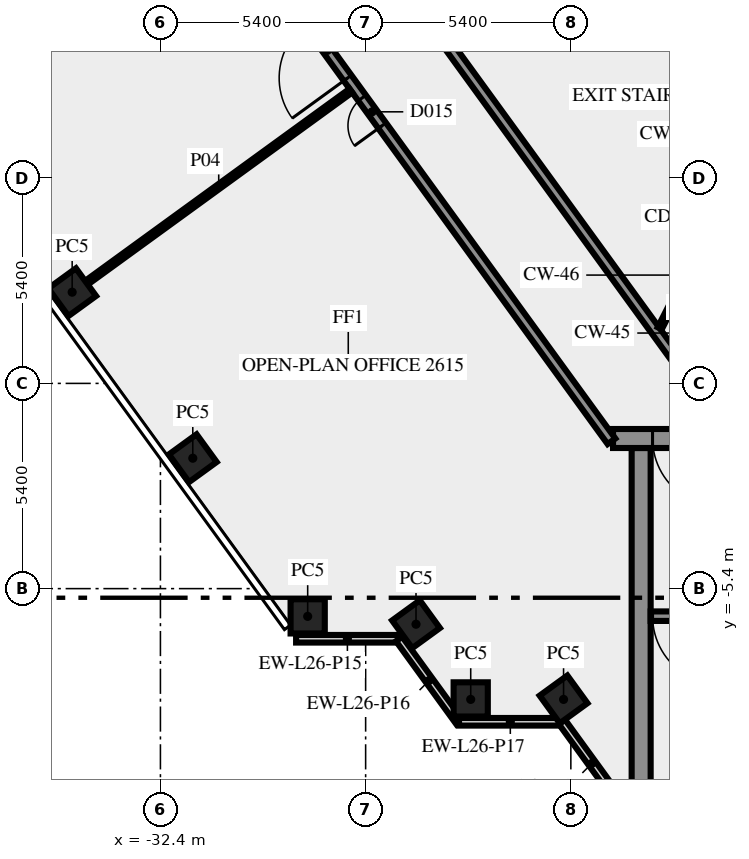
"""IFC4 building model, lengths in metres.
Left out: names, types, materials, properties, quantities, classifications, styles, units other than length and angle.
Written with IfcOpenShell. Run it as: python <this file> out.ifc"""

import sys

from ifc_helpers import new_model, si_unit, direction, frame, frame_2d, origin, origin_2d, place, context, subcontext, project, spatial, rectangle, extrude, element, fill, save


model = new_model("IFC4")
c1 = context("Model", 3, precision=1e-05, world=origin(), true_north=direction((0.0, 1.0)))
c2 = subcontext(c1, "Body", "Model", "MODEL_VIEW")
j1 = project(units=[si_unit("LENGTHUNIT", "METRE"), si_unit("PLANEANGLEUNIT", "RADIAN")], contexts=[c1])
p1 = place(None, origin())
s1 = spatial("IfcSite", under=j1, at=p1, CompositionType="ELEMENT")
p2 = place(p1, origin())
s2 = spatial("IfcBuilding", under=s1, at=p2, CompositionType="ELEMENT")
p3 = place(p2, frame((0.0, 0.0, 113.0)))
s3 = spatial("IfcBuildingStorey", under=s2, at=p3, CompositionType="ELEMENT", Elevation=113.0)
for number, where, z_axis, x_axis in (
    (1, (-34.722, 2.4, 0.0), (0.0, 0.0, 1.0), (0.588, -0.809, 0.0)),
    (2, (-31.548, -1.969, 0.0), (0.0, 0.0, 1.0), (0.588, -0.809, 0.0)),
    (3, (-28.525, -6.13, 0.0), (0.0, 0.0, 1.0), (1.0, 0.0, 0.0)),
    (4, (-25.674, -6.337, 0.0), (0.0, 0.0, 1.0), (0.588, -0.809, 0.0)),
    (5, (-24.235, -8.315, 0.0), (0.0, 0.0, 1.0), (1.0, 0.0, 0.0)),
    (6, (-21.792, -8.315, 0.0), (0.0, 0.0, 1.0), (0.588, -0.809, 0.0)),
):
    element("IfcColumn", number, at=place(p3, frame(where, z_axis=z_axis, x_axis=x_axis)), inside=s3, PredefinedType="COLUMN", context=c2, shape_type="SweptSolid", body=[
        extrude(rectangle(XDim=0.9, YDim=0.9, at=origin_2d()), origin(), (0.0, 0.0, 1.0), 3.65),
    ])
p4 = place(p3, frame((-28.83, -6.719, 0.0), z_axis=(0.0, 0.0, 1.0), x_axis=(1.0, 0.0, 0.0)))
e7 = element("IfcWall", 7, at=p4, inside=s3, PredefinedType="SOLIDWALL", context=c2, shape_type="SweptSolid", body=[
    extrude(rectangle(XDim=2.7, YDim=0.2, at=frame_2d((1.35, 0.0))), origin(), (0.0, 0.0, 1.0), 3.65),
])
p5 = place(p3, frame((-26.12, -6.724, 0.0), z_axis=(0.0, 0.0, 1.0), x_axis=(0.587720002413, -0.809064397168, 0.0)))
e8 = element("IfcWall", 8, at=p5, inside=s3, PredefinedType="SOLIDWALL", context=c2, shape_type="SweptSolid", body=[
    extrude(rectangle(XDim=2.7, YDim=0.2, at=frame_2d((1.35, 0.0))), origin(), (0.0, 0.0, 1.0), 3.65),
])
p6 = place(p3, frame((-24.543, -8.904, 0.0), z_axis=(0.0, 0.0, 1.0), x_axis=(1.0, 0.0, 0.0)))
e9 = element("IfcWall", 9, at=p6, inside=s3, PredefinedType="SOLIDWALL", context=c2, shape_type="SweptSolid", body=[
    extrude(rectangle(XDim=2.7, YDim=0.2, at=frame_2d((1.35, 0.0))), origin(), (0.0, 0.0, 1.0), 3.65),
])
p7 = place(p3, frame((-21.833, -8.909, 0.0), z_axis=(0.0, 0.0, 1.0), x_axis=(0.587766567315, -0.809030569476, 0.0)))
e10 = element("IfcWall", 10, at=p7, inside=s3, PredefinedType="SOLIDWALL", context=c2, shape_type="SweptSolid", body=[
    extrude(rectangle(XDim=2.688, YDim=0.2, at=frame_2d((1.344, 0.0))), origin(), (0.0, 0.0, 1.0), 3.65),
])
p8 = place(p3, frame((-19.75, -10.5, 0.0), z_axis=(0.0, 0.0, 1.0), x_axis=(0.0, 1.0, 0.0)))
e11 = element("IfcWall", 11, at=p8, inside=s3, PredefinedType="SHEAR", context=c2, shape_type="SweptSolid", body=[
    extrude(rectangle(XDim=8.8, YDim=0.5, at=frame_2d((4.4, 0.0))), origin(), (0.0, 0.0, 1.0), 3.65),
])
p9 = place(p3, frame((-11.45, -6.125, 0.0), z_axis=(0.0, 0.0, 1.0), x_axis=(-1.0, 0.0, 0.0)))
e12 = element("IfcWall", 12, at=p9, inside=s3, PredefinedType="SHEAR", context=c2, shape_type="SweptSolid", body=[
    extrude(rectangle(XDim=8.05, YDim=0.25, at=frame_2d((4.025, 0.0))), origin(), (0.0, 0.0, 1.0), 3.65),
])
p10 = place(p9, frame((6.2, 0.0, 0.0)))
e13 = element("IfcOpeningElement", 13, at=p10, cuts=e12, PredefinedType="OPENING", context=c2, shape_type="SweptSolid", body=[
    extrude(rectangle(XDim=1.8, YDim=2.1, at=frame_2d((0.9, 1.05))), frame((0.0, 0.135, 0.0), z_axis=(0.0, -1.0, 0.0), x_axis=(1.0, 0.0, 0.0)), (0.0, 0.0, 1.0), 0.27),
])
p11 = place(p3, frame((20.49, -1.45, 0.0), z_axis=(0.0, 0.0, 1.0), x_axis=(-1.0, 0.0, 0.0)))
e14 = element("IfcWall", 14, at=p11, inside=s3, PredefinedType="SHEAR", context=c2, shape_type="SweptSolid", body=[
    extrude(rectangle(XDim=40.98, YDim=0.5, at=frame_2d((20.49, 0.0))), origin(), (0.0, 0.0, 1.0), 3.65),
])
p12 = place(p11, frame((38.14, 0.0, 0.0)))
e15 = element("IfcOpeningElement", 15, at=p12, cuts=e14, PredefinedType="OPENING", context=c2, shape_type="SweptSolid", body=[
    extrude(rectangle(XDim=1.8, YDim=2.1, at=frame_2d((0.9, 1.05))), frame((0.0, 0.26, 0.0), z_axis=(0.0, -1.0, 0.0), x_axis=(1.0, 0.0, 0.0)), (0.0, 0.0, 1.0), 0.52),
])
p13 = place(p11, frame((36.728, 0.0, 0.0)))
e16 = element("IfcOpeningElement", 16, at=p13, cuts=e14, PredefinedType="OPENING", context=c2, shape_type="SweptSolid", body=[
    extrude(rectangle(XDim=0.8, YDim=2.1, at=frame_2d((0.4, 1.05))), frame((0.0, 0.26, 0.0), z_axis=(0.0, -1.0, 0.0), x_axis=(1.0, 0.0, 0.0)), (0.0, 0.0, 1.0), 0.52),
])
p14 = place(p11, frame((35.153, 0.0, 0.0)))
e17 = element("IfcOpeningElement", 17, at=p14, cuts=e14, PredefinedType="OPENING", context=c2, shape_type="SweptSolid", body=[
    extrude(rectangle(XDim=0.8, YDim=2.1, at=frame_2d((0.4, 1.05))), frame((0.0, 0.26, 0.0), z_axis=(0.0, -1.0, 0.0), x_axis=(1.0, 0.0, 0.0)), (0.0, 0.0, 1.0), 0.52),
])
p15 = place(p11, frame((32.94, 0.0, 0.0)))
e18 = element("IfcOpeningElement", 18, at=p15, cuts=e14, PredefinedType="OPENING", context=c2, shape_type="SweptSolid", body=[
    extrude(rectangle(XDim=0.9, YDim=2.1, at=frame_2d((0.45, 1.05))), frame((0.0, 0.26, 0.0), z_axis=(0.0, -1.0, 0.0), x_axis=(1.0, 0.0, 0.0)), (0.0, 0.0, 1.0), 0.52),
])
p16 = place(p11, frame((21.765, 0.0, 0.0)))
e19 = element("IfcOpeningElement", 19, at=p16, cuts=e14, PredefinedType="OPENING", context=c2, shape_type="SweptSolid", body=[
    extrude(rectangle(XDim=2.0, YDim=2.1, at=frame_2d((1.0, 1.05))), frame((0.0, 0.26, 0.0), z_axis=(0.0, -1.0, 0.0), x_axis=(1.0, 0.0, 0.0)), (0.0, 0.0, 1.0), 0.52),
])
p17 = place(p11, frame((7.14, 0.0, 0.0)))
e20 = element("IfcOpeningElement", 20, at=p17, cuts=e14, PredefinedType="OPENING", context=c2, shape_type="SweptSolid", body=[
    extrude(rectangle(XDim=0.9, YDim=2.1, at=frame_2d((0.45, 1.05))), frame((0.0, 0.26, 0.0), z_axis=(0.0, -1.0, 0.0), x_axis=(1.0, 0.0, 0.0)), (0.0, 0.0, 1.0), 0.52),
])
p18 = place(p11, frame((4.19, 0.0, 0.0)))
e21 = element("IfcOpeningElement", 21, at=p18, cuts=e14, PredefinedType="OPENING", context=c2, shape_type="SweptSolid", body=[
    extrude(rectangle(XDim=0.9, YDim=2.1, at=frame_2d((0.45, 1.05))), frame((0.0, 0.26, 0.0), z_axis=(0.0, -1.0, 0.0), x_axis=(1.0, 0.0, 0.0)), (0.0, 0.0, 1.0), 0.52),
])
p19 = place(p11, frame((1.04, 0.0, 0.0)))
e22 = element("IfcOpeningElement", 22, at=p19, cuts=e14, PredefinedType="OPENING", context=c2, shape_type="SweptSolid", body=[
    extrude(rectangle(XDim=1.8, YDim=2.1, at=frame_2d((0.9, 1.05))), frame((0.0, 0.26, 0.0), z_axis=(0.0, -1.0, 0.0), x_axis=(1.0, 0.0, 0.0)), (0.0, 0.0, 1.0), 0.52),
])
p20 = place(p3, frame((-20.531, -1.523, 0.0), z_axis=(0.0, 0.0, 1.0), x_axis=(-0.587784522481, 0.809017524614, 0.0)))
e23 = element("IfcWall", 23, at=p20, inside=s3, PredefinedType="SOLIDWALL", context=c2, shape_type="SweptSolid", body=[
    extrude(rectangle(XDim=49.912, YDim=0.25, at=frame_2d((24.956, 0.0))), origin(), (0.0, 0.0, 1.0), 3.65),
])
p21 = place(p20, frame((10.266, 0.0, 0.0)))
e24 = element("IfcOpeningElement", 24, at=p21, cuts=e23, PredefinedType="OPENING", context=c2, shape_type="SweptSolid", body=[
    extrude(rectangle(XDim=0.9, YDim=2.1, at=frame_2d((0.45, 1.05))), frame((0.0, 0.135, 0.0), z_axis=(0.0, -1.0, 0.0), x_axis=(1.0, 0.0, 0.0)), (0.0, 0.0, 1.0), 0.27),
])
p22 = place(p20, frame((32.366, 0.0, 0.0)))
e25 = element("IfcOpeningElement", 25, at=p22, cuts=e23, PredefinedType="OPENING", context=c2, shape_type="SweptSolid", body=[
    extrude(rectangle(XDim=1.8, YDim=2.1, at=frame_2d((0.9, 1.05))), frame((0.0, 0.135, 0.0), z_axis=(0.0, -1.0, 0.0), x_axis=(1.0, 0.0, 0.0)), (0.0, 0.0, 1.0), 0.27),
])
p23 = place(p20, frame((11.815, 0.0, 0.0)))
e26 = element("IfcOpeningElement", 26, at=p23, cuts=e23, PredefinedType="OPENING", context=c2, shape_type="SweptSolid", body=[
    extrude(rectangle(XDim=1.8, YDim=2.1, at=frame_2d((0.9, 1.05))), frame((0.0, 0.135, 0.0), z_axis=(0.0, -1.0, 0.0), x_axis=(1.0, 0.0, 0.0)), (0.0, 0.0, 1.0), 0.27),
])
p24 = place(p20, frame((48.57, 0.0, 0.0)))
e27 = element("IfcOpeningElement", 27, at=p24, cuts=e23, PredefinedType="OPENING", context=c2, shape_type="SweptSolid", body=[
    extrude(rectangle(XDim=0.9, YDim=2.1, at=frame_2d((0.45, 1.05))), frame((0.0, 0.135, 0.0), z_axis=(0.0, -1.0, 0.0), x_axis=(1.0, 0.0, 0.0)), (0.0, 0.0, 1.0), 0.27),
])
p25 = place(p20, frame((35.915, 0.0, 0.0)))
e28 = element("IfcOpeningElement", 28, at=p25, cuts=e23, PredefinedType="OPENING", context=c2, shape_type="SweptSolid", body=[
    extrude(rectangle(XDim=0.9, YDim=2.1, at=frame_2d((0.45, 1.05))), frame((0.0, 0.135, 0.0), z_axis=(0.0, -1.0, 0.0), x_axis=(1.0, 0.0, 0.0)), (0.0, 0.0, 1.0), 0.27),
])
p26 = place(p3, frame((-37.232, 25.972, 0.0), z_axis=(0.0, 0.0, 1.0), x_axis=(0.587786323093, -0.809016216391, 0.0)))
e29 = element("IfcWall", 29, at=p26, inside=s3, PredefinedType="SOLIDWALL", context=c2, shape_type="SweptSolid", body=[
    extrude(rectangle(XDim=33.493, YDim=0.25, at=frame_2d((16.747, 0.0))), origin(), (0.0, 0.0, 1.0), 3.65),
])
p27 = place(p26, frame((5.385, 0.0, 0.0)))
e30 = element("IfcOpeningElement", 30, at=p27, cuts=e29, PredefinedType="OPENING", context=c2, shape_type="SweptSolid", body=[
    extrude(rectangle(XDim=0.9, YDim=2.1, at=frame_2d((0.45, 1.05))), frame((0.0, 0.135, 0.0), z_axis=(0.0, -1.0, 0.0), x_axis=(1.0, 0.0, 0.0)), (0.0, 0.0, 1.0), 0.27),
])
p28 = place(p26, frame((6.985, 0.0, 0.0)))
e31 = element("IfcOpeningElement", 31, at=p28, cuts=e29, PredefinedType="OPENING", context=c2, shape_type="SweptSolid", body=[
    extrude(rectangle(XDim=0.9, YDim=2.1, at=frame_2d((0.45, 1.05))), frame((0.0, 0.135, 0.0), z_axis=(0.0, -1.0, 0.0), x_axis=(1.0, 0.0, 0.0)), (0.0, 0.0, 1.0), 0.27),
])
p29 = place(p3, frame((-27.389, 7.703, 0.0), z_axis=(0.0, 0.0, 1.0), x_axis=(-0.809052894195, -0.587735837256, 0.0)))
e32 = element("IfcWall", 32, at=p29, inside=s3, PredefinedType="PARTITIONING", context=c2, shape_type="SweptSolid", body=[
    extrude(rectangle(XDim=8.594, YDim=0.12, at=frame_2d((4.297, 0.0))), origin(), (0.0, 0.0, 1.0), 3.65),
])
p30 = place(p3, frame((-19.261, 1.45, 0.0), z_axis=(0.0, 0.0, 1.0), x_axis=(0.453950796792, 0.891026752736, 0.0)))
e33 = element("IfcWall", 33, at=p30, inside=s3, PredefinedType="PARTITIONING", context=c2, shape_type="SweptSolid", body=[
    extrude(rectangle(XDim=2.778, YDim=0.12, at=frame_2d((1.389, 0.0))), origin(), (0.0, 0.0, 1.0), 3.65),
])
p31 = place(p10, origin())
e34 = element("IfcDoor", 34, at=p31, inside=s3, OperationType="DOUBLE_DOOR_SINGLE_SWING", PredefinedType="DOOR", context=c2, shape_type="SweptSolid", body=[
    extrude(rectangle(XDim=1.8, YDim=2.1, at=frame_2d((0.9, 1.05))), frame((0.0, 0.025, 0.0), z_axis=(0.0, -1.0, 0.0), x_axis=(1.0, 0.0, 0.0)), (0.0, 0.0, 1.0), 0.05),
])
fill(e13, e34)
p32 = place(p12, origin())
e35 = element("IfcDoor", 35, at=p32, inside=s3, OperationType="DOUBLE_DOOR_SINGLE_SWING", PredefinedType="DOOR", context=c2, shape_type="SweptSolid", body=[
    extrude(rectangle(XDim=1.8, YDim=2.1, at=frame_2d((0.9, 1.05))), frame((0.0, 0.025, 0.0), z_axis=(0.0, -1.0, 0.0), x_axis=(1.0, 0.0, 0.0)), (0.0, 0.0, 1.0), 0.05),
])
fill(e15, e35)
p33 = place(p21, origin())
e36 = element("IfcDoor", 36, at=p33, inside=s3, OperationType="SINGLE_SWING_RIGHT", PredefinedType="DOOR", context=c2, shape_type="SweptSolid", body=[
    extrude(rectangle(XDim=0.9, YDim=2.1, at=frame_2d((0.45, 1.05))), frame((0.0, 0.025, 0.0), z_axis=(0.0, -1.0, 0.0), x_axis=(1.0, 0.0, 0.0)), (0.0, 0.0, 1.0), 0.05),
])
fill(e24, e36)
p34 = place(p23, origin())
e37 = element("IfcDoor", 37, at=p34, inside=s3, OperationType="DOUBLE_DOOR_SINGLE_SWING", PredefinedType="DOOR", context=c2, shape_type="SweptSolid", body=[
    extrude(rectangle(XDim=1.8, YDim=2.1, at=frame_2d((0.9, 1.05))), frame((0.0, 0.025, 0.0), z_axis=(0.0, -1.0, 0.0), x_axis=(1.0, 0.0, 0.0)), (0.0, 0.0, 1.0), 0.05),
])
fill(e26, e37)
save(model, sys.argv[1])
